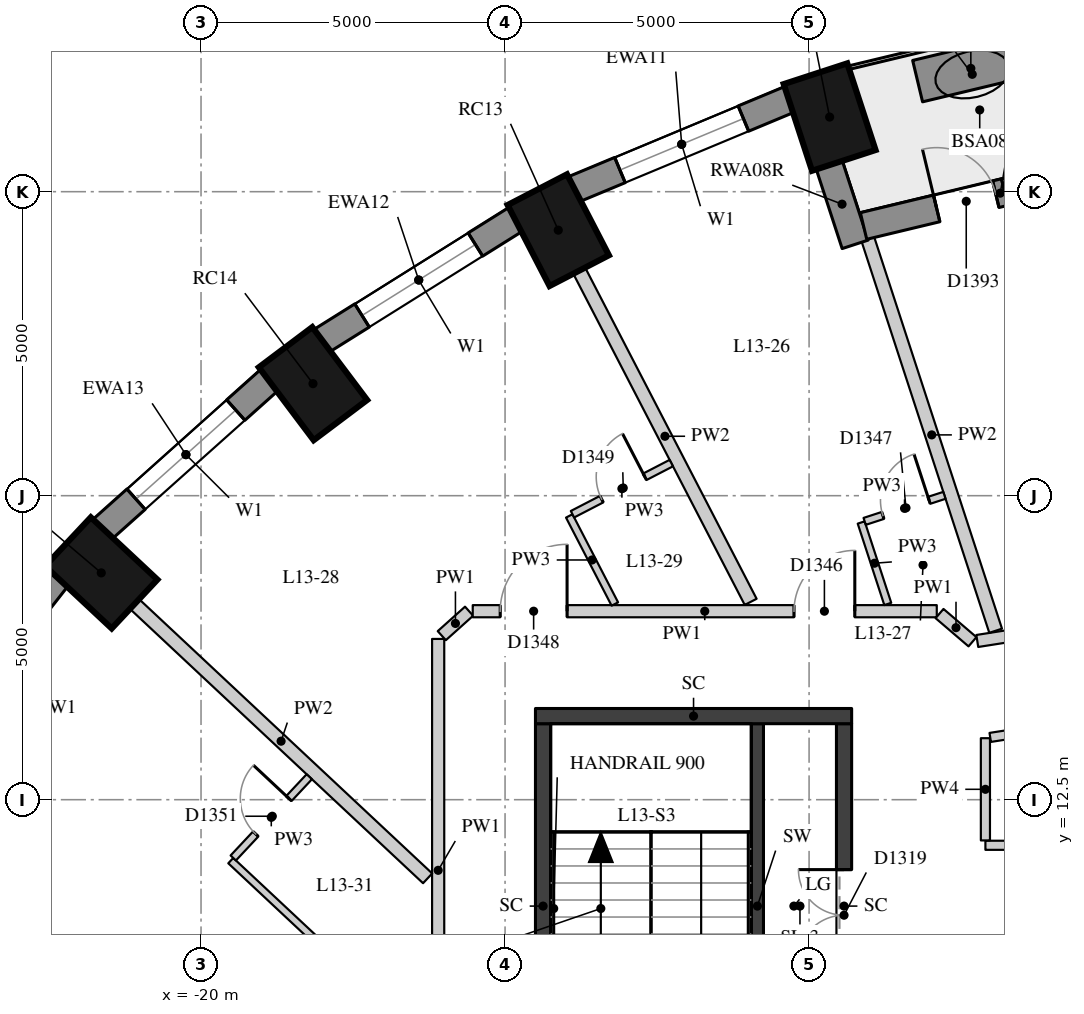
"""IFC4 building model, lengths in metres.
Left out: names, types, materials, properties, quantities, classifications, styles, units other than length and angle.
Written with IfcOpenShell. Run it as: python <this file> out.ifc"""

import sys

from ifc_helpers import new_model, si_unit, direction, frame, frame_2d, origin, origin_2d, place, context, subcontext, project, spatial, rectangle, extrude, element, fill, save


model = new_model("IFC4")
c1 = context("Model", 3, precision=1e-05, world=origin(), true_north=direction((0.0, 1.0)))
c2 = subcontext(c1, "Body", "Model", "MODEL_VIEW")
j1 = project(units=[si_unit("LENGTHUNIT", "METRE"), si_unit("PLANEANGLEUNIT", "RADIAN")], contexts=[c1])
p1 = place(None, origin())
s1 = spatial("IfcSite", under=j1, at=p1, CompositionType="ELEMENT")
p2 = place(p1, origin())
s2 = spatial("IfcBuilding", under=s1, at=p2, CompositionType="ELEMENT")
p3 = place(p2, frame((0.0, 0.0, 51.4)))
s3 = spatial("IfcBuildingStorey", under=s2, at=p3, CompositionType="ELEMENT", Elevation=51.4)
for number, where, z_axis, x_axis in (
    (1, (-9.662, 23.727, 0.0), (0.0, 0.0, 1.0), (-0.31, 0.951, 0.0)),
    (2, (-14.125, 21.867, 0.0), (0.0, 0.0, 1.0), (-0.46, 0.888, 0.0)),
    (3, (-18.159, 19.343, 0.0), (0.0, 0.0, 1.0), (-0.601, 0.799, 0.0)),
    (4, (-21.641, 16.23, 0.0), (0.0, 0.0, 1.0), (-0.73, 0.683, 0.0)),
):
    element("IfcColumn", number, at=place(p3, frame(where, z_axis=z_axis, x_axis=x_axis)), inside=s3, PredefinedType="COLUMN", context=c2, shape_type="SweptSolid", body=[
        extrude(rectangle(XDim=1.5, YDim=1.1, at=origin_2d()), origin(), (0.0, 0.0, 1.0), 3.3),
    ])
p4 = place(p3, frame((-10.315, 24.021, 0.0), z_axis=(0.0, 0.0, 1.0), x_axis=(-0.923031964282, -0.384723267966, 0.0)))
e5 = element("IfcWall", 5, at=p4, inside=s3, PredefinedType="SOLIDWALL", context=c2, shape_type="SweptSolid", body=[
    extrude(rectangle(XDim=3.856, YDim=0.45, at=frame_2d((1.928, 0.0))), origin(), (0.0, 0.0, 1.0), 3.02),
])
p5 = place(p4, frame((0.828, 0.0, 0.4)))
e6 = element("IfcOpeningElement", 6, at=p5, cuts=e5, PredefinedType="OPENING", context=c2, shape_type="SweptSolid", body=[
    extrude(rectangle(XDim=2.2, YDim=1.75, at=frame_2d((1.1, 0.875))), frame((0.0, 0.235, 0.0), z_axis=(0.0, -1.0, 0.0), x_axis=(1.0, 0.0, 0.0)), (0.0, 0.0, 1.0), 0.47),
])
p6 = place(p3, frame((-14.817, 22.051, 0.0), z_axis=(0.0, 0.0, 1.0), x_axis=(-0.847635480093, -0.530579016629, 0.0)))
e7 = element("IfcWall", 7, at=p6, inside=s3, PredefinedType="SOLIDWALL", context=c2, shape_type="SweptSolid", body=[
    extrude(rectangle(XDim=3.782, YDim=0.45, at=frame_2d((1.891, 0.0))), origin(), (0.0, 0.0, 1.0), 3.02),
])
p7 = place(p6, frame((0.791, 0.0, 0.4)))
e8 = element("IfcOpeningElement", 8, at=p7, cuts=e7, PredefinedType="OPENING", context=c2, shape_type="SweptSolid", body=[
    extrude(rectangle(XDim=2.2, YDim=1.75, at=frame_2d((1.1, 0.875))), frame((0.0, 0.235, 0.0), z_axis=(0.0, -1.0, 0.0), x_axis=(1.0, 0.0, 0.0)), (0.0, 0.0, 1.0), 0.47),
])
p8 = place(p3, frame((-18.871, 19.407, 0.0), z_axis=(0.0, 0.0, 1.0), x_axis=(-0.745526233716, -0.66647628228, 0.0)))
e9 = element("IfcWall", 9, at=p8, inside=s3, PredefinedType="SOLIDWALL", context=c2, shape_type="SweptSolid", body=[
    extrude(rectangle(XDim=3.697, YDim=0.45, at=frame_2d((1.848, 0.0))), origin(), (0.0, 0.0, 1.0), 3.02),
])
p9 = place(p8, frame((0.749, 0.0, 0.4)))
e10 = element("IfcOpeningElement", 10, at=p9, cuts=e9, PredefinedType="OPENING", context=c2, shape_type="SweptSolid", body=[
    extrude(rectangle(XDim=2.2, YDim=1.75, at=frame_2d((1.1, 0.875))), frame((0.0, 0.235, 0.0), z_axis=(0.0, -1.0, 0.0), x_axis=(1.0, 0.0, 0.0)), (0.0, 0.0, 1.0), 0.47),
])
p10 = place(p3, frame((-22.352, 16.17, 0.0), z_axis=(0.0, 0.0, 1.0), x_axis=(-0.616661975264, -0.787228053529, 0.0)))
e11 = element("IfcWall", 11, at=p10, inside=s3, PredefinedType="SOLIDWALL", context=c2, shape_type="SweptSolid", body=[
    extrude(rectangle(XDim=3.61, YDim=0.45, at=frame_2d((1.805, 0.0))), origin(), (0.0, 0.0, 1.0), 3.02),
])
p11 = place(p10, frame((0.705, 0.0, 0.4)))
e12 = element("IfcOpeningElement", 12, at=p11, cuts=e11, PredefinedType="OPENING", context=c2, shape_type="SweptSolid", body=[
    extrude(rectangle(XDim=2.2, YDim=1.75, at=frame_2d((1.1, 0.875))), frame((0.0, 0.235, 0.0), z_axis=(0.0, -1.0, 0.0), x_axis=(1.0, 0.0, 0.0)), (0.0, 0.0, 1.0), 0.47),
])
p12 = place(p3, frame((-9.674, 22.956, 0.0), z_axis=(0.0, 0.0, 1.0), x_axis=(0.310269011655, -0.950648799719, 0.0)))
e13 = element("IfcWall", 13, at=p12, inside=s3, PredefinedType="SOLIDWALL", context=c2, shape_type="SweptSolid", body=[
    extrude(rectangle(XDim=1.39, YDim=0.45, at=frame_2d((0.695, 0.0))), origin(), (0.0, 0.0, 1.0), 3.02),
])
p13 = place(p3, frame((-4.608, 23.016, 0.0), z_axis=(0.0, 0.0, 1.0), x_axis=(-0.972343667289, -0.233554688847, 0.0)))
e14 = element("IfcWall", 14, at=p13, inside=s3, PredefinedType="SOLIDWALL", context=c2, shape_type="SweptSolid", body=[
    extrude(rectangle(XDim=4.624, YDim=0.45, at=frame_2d((2.312, 0.0))), origin(), (0.0, 0.0, 1.0), 3.02),
])
p14 = place(p13, frame((1.237, 0.0, 0.4)))
e15 = element("IfcOpeningElement", 15, at=p14, cuts=e14, PredefinedType="OPENING", context=c2, shape_type="SweptSolid", body=[
    extrude(rectangle(XDim=1.0, YDim=1.75, at=frame_2d((0.5, 0.875))), frame((0.0, 0.235, 0.0), z_axis=(0.0, -1.0, 0.0), x_axis=(1.0, 0.0, 0.0)), (0.0, 0.0, 1.0), 0.47),
])
p15 = place(p13, frame((2.387, 0.0, 0.0)))
e16 = element("IfcOpeningElement", 16, at=p15, cuts=e14, PredefinedType="OPENING", context=c2, shape_type="SweptSolid", body=[
    extrude(rectangle(XDim=1.0, YDim=2.15, at=frame_2d((0.5, 1.075))), frame((0.0, 0.235, 0.0), z_axis=(0.0, -1.0, 0.0), x_axis=(1.0, 0.0, 0.0)), (0.0, 0.0, 1.0), 0.47),
])
p16 = place(p3, frame((-6.465, 24.737, 0.0), z_axis=(0.0, 0.0, 1.0), x_axis=(-0.972504142103, -0.232885580473, 0.0)))
e17 = element("IfcWall", 17, at=p16, inside=s3, PredefinedType="USERDEFINED", context=c2, shape_type="SweptSolid", body=[
    extrude(rectangle(XDim=1.8, YDim=0.7, at=frame_2d((0.9, 0.0))), origin(), (0.0, 0.0, 1.0), 0.75),
])
p17 = place(p3, frame((-10.85, 7.75, 0.0), z_axis=(0.0, 0.0, 1.0), x_axis=(0.0, 1.0, 0.0)))
e18 = element("IfcWall", 18, at=p17, inside=s3, PredefinedType="SHEAR", context=c2, shape_type="SweptSolid", body=[
    extrude(rectangle(XDim=6.0, YDim=0.2, at=frame_2d((3.0, 0.0))), origin(), (0.0, 0.0, 1.0), 3.02),
])
p18 = place(p17, frame((0.1, 0.0, 0.0)))
e19 = element("IfcOpeningElement", 19, at=p18, cuts=e18, PredefinedType="OPENING", context=c2, shape_type="SweptSolid", body=[
    extrude(rectangle(XDim=1.5, YDim=2.1, at=frame_2d((0.75, 1.05))), frame((0.0, 0.11, 0.0), z_axis=(0.0, -1.0, 0.0), x_axis=(1.0, 0.0, 0.0)), (0.0, 0.0, 1.0), 0.22),
])
p19 = place(p3, frame((-14.375, 7.75, -0.28), z_axis=(0.0, 0.0, 1.0), x_axis=(0.0, 1.0, 0.0)))
e20 = element("IfcWall", 20, at=p19, inside=s3, PredefinedType="SHEAR", context=c2, shape_type="SweptSolid", body=[
    extrude(rectangle(XDim=6.0, YDim=0.25, at=frame_2d((3.0, 0.0))), origin(), (0.0, 0.0, 1.0), 3.3),
])
p20 = place(p3, frame((-9.425, 7.75, -0.28), z_axis=(0.0, 0.0, 1.0), x_axis=(0.0, 1.0, 0.0)))
e21 = element("IfcWall", 21, at=p20, inside=s3, PredefinedType="SHEAR", context=c2, shape_type="SweptSolid", body=[
    extrude(rectangle(XDim=6.0, YDim=0.25, at=frame_2d((3.0, 0.0))), origin(), (0.0, 0.0, 1.0), 3.3),
])
p21 = place(p20, frame((2.1, 0.0, 0.28)))
e22 = element("IfcOpeningElement", 22, at=p21, cuts=e21, PredefinedType="OPENING", context=c2, shape_type="SweptSolid", body=[
    extrude(rectangle(XDim=1.5, YDim=2.1, at=frame_2d((0.75, 1.05))), frame((0.0, 0.135, 0.0), z_axis=(0.0, -1.0, 0.0), x_axis=(1.0, 0.0, 0.0)), (0.0, 0.0, 1.0), 0.27),
])
p22 = place(p3, frame((-14.5, 13.875, -0.28), z_axis=(0.0, 0.0, 1.0), x_axis=(1.0, 0.0, 0.0)))
e23 = element("IfcWall", 23, at=p22, inside=s3, PredefinedType="SHEAR", context=c2, shape_type="SweptSolid", body=[
    extrude(rectangle(XDim=5.2, YDim=0.25, at=frame_2d((2.6, 0.0))), origin(), (0.0, 0.0, 1.0), 3.3),
])
p23 = place(p3, frame((-16.1, 7.533, 0.0), z_axis=(0.0, 0.0, 1.0), x_axis=(0.0, 1.0, 0.0)))
e24 = element("IfcWall", 24, at=p23, inside=s3, PredefinedType="PARTITIONING", context=c2, shape_type="SweptSolid", body=[
    extrude(rectangle(XDim=7.611, YDim=0.2, at=frame_2d((3.806, 0.0))), origin(), (0.0, 0.0, 1.0), 3.02),
])
p24 = place(p3, frame((-16.041, 15.198, 0.0), z_axis=(0.0, 0.0, 1.0), x_axis=(0.744722115519, 0.667374685359, 0.0)))
e25 = element("IfcWall", 25, at=p24, inside=s3, PredefinedType="PARTITIONING", context=c2, shape_type="SweptSolid", body=[
    extrude(rectangle(XDim=0.603, YDim=0.2, at=frame_2d((0.301, 0.0))), origin(), (0.0, 0.0, 1.0), 3.02),
])
p25 = place(p3, frame((-15.531, 15.6, 0.0), z_axis=(0.0, 0.0, 1.0), x_axis=(1.0, 0.0, 0.0)))
e26 = element("IfcWall", 26, at=p25, inside=s3, PredefinedType="PARTITIONING", context=c2, shape_type="SweptSolid", body=[
    extrude(rectangle(XDim=7.632, YDim=0.2, at=frame_2d((3.816, 0.0))), origin(), (0.0, 0.0, 1.0), 3.02),
])
p26 = place(p25, frame((5.283, 0.0, 0.0)))
e27 = element("IfcOpeningElement", 27, at=p26, cuts=e26, PredefinedType="OPENING", context=c2, shape_type="SweptSolid", body=[
    extrude(rectangle(XDim=1.0, YDim=2.1, at=frame_2d((0.5, 1.05))), frame((0.0, 0.11, 0.0), z_axis=(0.0, -1.0, 0.0), x_axis=(1.0, 0.0, 0.0)), (0.0, 0.0, 1.0), 0.22),
])
p27 = place(p25, frame((0.451, 0.0, 0.0)))
e28 = element("IfcOpeningElement", 28, at=p27, cuts=e26, PredefinedType="OPENING", context=c2, shape_type="SweptSolid", body=[
    extrude(rectangle(XDim=1.1, YDim=2.1, at=frame_2d((0.55, 1.05))), frame((0.0, 0.11, 0.0), z_axis=(0.0, -1.0, 0.0), x_axis=(1.0, 0.0, 0.0)), (0.0, 0.0, 1.0), 0.22),
])
p28 = place(p3, frame((-7.854, 15.561, 0.0), z_axis=(0.0, 0.0, 1.0), x_axis=(0.759763914627, -0.650199041856, 0.0)))
e29 = element("IfcWall", 29, at=p28, inside=s3, PredefinedType="PARTITIONING", context=c2, shape_type="SweptSolid", body=[
    extrude(rectangle(XDim=0.713, YDim=0.2, at=frame_2d((0.356, 0.0))), origin(), (0.0, 0.0, 1.0), 3.02),
])
p29 = place(p3, frame((-7.234, 15.11, 0.0), z_axis=(0.0, 0.0, 1.0), x_axis=(0.987957763282, 0.154723811906, 0.0)))
e30 = element("IfcWall", 30, at=p29, inside=s3, PredefinedType="PARTITIONING", context=c2, shape_type="SweptSolid", body=[
    extrude(rectangle(XDim=11.012, YDim=0.2, at=frame_2d((5.506, 0.0))), origin(), (0.0, 0.0, 1.0), 3.02),
])
p30 = place(p29, frame((8.605, 0.0, 0.0)))
e31 = element("IfcOpeningElement", 31, at=p30, cuts=e30, PredefinedType="OPENING", context=c2, shape_type="SweptSolid", body=[
    extrude(rectangle(XDim=0.9, YDim=2.1, at=frame_2d((0.45, 1.05))), frame((0.0, 0.11, 0.0), z_axis=(0.0, -1.0, 0.0), x_axis=(1.0, 0.0, 0.0)), (0.0, 0.0, 1.0), 0.22),
])
p31 = place(p29, frame((5.116, 0.0, 0.0)))
e32 = element("IfcOpeningElement", 32, at=p31, cuts=e30, PredefinedType="OPENING", context=c2, shape_type="SweptSolid", body=[
    extrude(rectangle(XDim=0.9, YDim=2.1, at=frame_2d((0.45, 1.05))), frame((0.0, 0.11, 0.0), z_axis=(0.0, -1.0, 0.0), x_axis=(1.0, 0.0, 0.0)), (0.0, 0.0, 1.0), 0.22),
])
p32 = place(p29, frame((1.626, 0.0, 0.0)))
e33 = element("IfcOpeningElement", 33, at=p32, cuts=e30, PredefinedType="OPENING", context=c2, shape_type="SweptSolid", body=[
    extrude(rectangle(XDim=0.9, YDim=2.1, at=frame_2d((0.45, 1.05))), frame((0.0, 0.11, 0.0), z_axis=(0.0, -1.0, 0.0), x_axis=(1.0, 0.0, 0.0)), (0.0, 0.0, 1.0), 0.22),
])
p33 = place(p3, frame((-4.58, 11.75, 0.0), z_axis=(0.0, 0.0, 1.0), x_axis=(-1.0, 0.0, 0.0)))
e34 = element("IfcWall", 34, at=p33, inside=s3, PredefinedType="PARTITIONING", context=c2, shape_type="SweptSolid", body=[
    extrude(rectangle(XDim=2.52, YDim=0.15, at=frame_2d((1.26, 0.0))), origin(), (0.0, 0.0, 1.0), 3.02),
])
p34 = place(p3, frame((-7.1, 11.83, 0.0), z_axis=(0.0, 0.0, 1.0), x_axis=(0.0, 1.0, 0.0)))
e35 = element("IfcWall", 35, at=p34, inside=s3, PredefinedType="PARTITIONING", context=c2, shape_type="SweptSolid", body=[
    extrude(rectangle(XDim=1.681, YDim=0.15, at=frame_2d((0.841, 0.0))), origin(), (0.0, 0.0, 1.0), 3.02),
])
p35 = place(p3, frame((-7.021, 13.524, 0.0), z_axis=(0.0, 0.0, 1.0), x_axis=(0.987976394461, 0.154604799366, 0.0)))
e36 = element("IfcWall", 36, at=p35, inside=s3, PredefinedType="PARTITIONING", context=c2, shape_type="SweptSolid", body=[
    extrude(rectangle(XDim=2.124, YDim=0.15, at=frame_2d((1.062, 0.0))), origin(), (0.0, 0.0, 1.0), 2.57),
])
p36 = place(p3, frame((-9.034, 21.721, 0.0), z_axis=(0.0, 0.0, 1.0), x_axis=(0.310212430052, -0.950667264736, 0.0)))
e37 = element("IfcWall", 37, at=p36, inside=s3, PredefinedType="PARTITIONING", context=c2, shape_type="SweptSolid", body=[
    extrude(rectangle(XDim=6.777, YDim=0.22, at=frame_2d((3.388, 0.0))), origin(), (0.0, 0.0, 1.0), 3.02),
])
p37 = place(p3, frame((-13.78, 21.201, 0.0), z_axis=(0.0, 0.0, 1.0), x_axis=(0.459699000582, -0.888074787878, 0.0)))
e38 = element("IfcWall", 38, at=p37, inside=s3, PredefinedType="PARTITIONING", context=c2, shape_type="SweptSolid", body=[
    extrude(rectangle(XDim=6.134, YDim=0.22, at=frame_2d((3.067, 0.0))), origin(), (0.0, 0.0, 1.0), 3.02),
])
p38 = place(p3, frame((-21.093, 15.718, 0.0), z_axis=(0.0, 0.0, 1.0), x_axis=(0.73009284205, -0.683347965525, 0.0)))
e39 = element("IfcWall", 39, at=p38, inside=s3, PredefinedType="PARTITIONING", context=c2, shape_type="SweptSolid", body=[
    extrude(rectangle(XDim=6.602, YDim=0.22, at=frame_2d((3.301, 0.0))), origin(), (0.0, 0.0, 1.0), 3.02),
])
p39 = place(p3, frame((-8.706, 15.719, 0.0), z_axis=(0.0, 0.0, 1.0), x_axis=(-0.310245242974, 0.950656556918, 0.0)))
e40 = element("IfcWall", 40, at=p39, inside=s3, PredefinedType="PARTITIONING", context=c2, shape_type="SweptSolid", body=[
    extrude(rectangle(XDim=1.409, YDim=0.12, at=frame_2d((0.705, 0.0))), origin(), (0.0, 0.0, 1.0), 3.02),
])
p40 = place(p3, frame((-13.194, 15.718, 0.0), z_axis=(0.0, 0.0, 1.0), x_axis=(-0.459736274936, 0.888055492359, 0.0)))
e41 = element("IfcWall", 41, at=p40, inside=s3, PredefinedType="PARTITIONING", context=c2, shape_type="SweptSolid", body=[
    extrude(rectangle(XDim=1.632, YDim=0.12, at=frame_2d((0.816, 0.0))), origin(), (0.0, 0.0, 1.0), 3.02),
])
p41 = place(p3, frame((-16.229, 8.426, 0.0), z_axis=(0.0, 0.0, 1.0), x_axis=(-0.730077325201, 0.683364543438, 0.0)))
e42 = element("IfcWall", 42, at=p41, inside=s3, PredefinedType="PARTITIONING", context=c2, shape_type="SweptSolid", body=[
    extrude(rectangle(XDim=4.495, YDim=0.12, at=frame_2d((2.247, 0.0))), origin(), (0.0, 0.0, 1.0), 3.02),
])
p42 = place(p3, frame((-9.086, 17.077, 0.0), z_axis=(0.0, 0.0, 1.0), x_axis=(0.950576687533, 0.310489872812, 0.0)))
e43 = element("IfcWall", 43, at=p42, inside=s3, PredefinedType="PARTITIONING", context=c2, shape_type="SweptSolid", body=[
    extrude(rectangle(XDim=1.38, YDim=0.12, at=frame_2d((0.69, 0.0))), origin(), (0.0, 0.0, 1.0), 3.02),
])
p43 = place(p42, frame((0.315, 0.0, 0.0)))
e44 = element("IfcOpeningElement", 44, at=p43, cuts=e43, PredefinedType="OPENING", context=c2, shape_type="SweptSolid", body=[
    extrude(rectangle(XDim=0.8, YDim=2.1, at=frame_2d((0.4, 1.05))), frame((0.0, 0.07, 0.0), z_axis=(0.0, -1.0, 0.0), x_axis=(1.0, 0.0, 0.0)), (0.0, 0.0, 1.0), 0.14),
])
p44 = place(p3, frame((-13.891, 17.195, 0.0), z_axis=(0.0, 0.0, 1.0), x_axis=(0.88806930088, 0.459709600546, 0.0)))
e45 = element("IfcWall", 45, at=p44, inside=s3, PredefinedType="PARTITIONING", context=c2, shape_type="SweptSolid", body=[
    extrude(rectangle(XDim=1.83, YDim=0.12, at=frame_2d((0.915, 0.0))), origin(), (0.0, 0.0, 1.0), 3.02),
])
p45 = place(p44, frame((0.54, 0.0, 0.0)))
e46 = element("IfcOpeningElement", 46, at=p45, cuts=e45, PredefinedType="OPENING", context=c2, shape_type="SweptSolid", body=[
    extrude(rectangle(XDim=0.8, YDim=2.1, at=frame_2d((0.4, 1.05))), frame((0.0, 0.07, 0.0), z_axis=(0.0, -1.0, 0.0), x_axis=(1.0, 0.0, 0.0)), (0.0, 0.0, 1.0), 0.14),
])
p46 = place(p3, frame((-19.47, 11.542, 0.0), z_axis=(0.0, 0.0, 1.0), x_axis=(0.683306289544, 0.730131847456, 0.0)))
e47 = element("IfcWall", 47, at=p46, inside=s3, PredefinedType="PARTITIONING", context=c2, shape_type="SweptSolid", body=[
    extrude(rectangle(XDim=1.83, YDim=0.12, at=frame_2d((0.915, 0.0))), origin(), (0.0, 0.0, 1.0), 3.02),
])
p47 = place(p46, frame((0.54, 0.0, 0.0)))
e48 = element("IfcOpeningElement", 48, at=p47, cuts=e47, PredefinedType="OPENING", context=c2, shape_type="SweptSolid", body=[
    extrude(rectangle(XDim=0.8, YDim=2.1, at=frame_2d((0.4, 1.05))), frame((0.0, 0.07, 0.0), z_axis=(0.0, -1.0, 0.0), x_axis=(1.0, 0.0, 0.0)), (0.0, 0.0, 1.0), 0.14),
])
p48 = place(p5, origin())
e49 = element("IfcWindow", 49, at=p48, inside=s3, PartitioningType="SINGLE_PANEL", PredefinedType="WINDOW", context=c2, shape_type="SweptSolid", body=[
    extrude(rectangle(XDim=2.2, YDim=1.75, at=frame_2d((1.1, 0.875))), frame((0.0, 0.035, 0.0), z_axis=(0.0, -1.0, 0.0), x_axis=(1.0, 0.0, 0.0)), (0.0, 0.0, 1.0), 0.06),
])
fill(e6, e49)
p49 = place(p7, origin())
e50 = element("IfcWindow", 50, at=p49, inside=s3, PartitioningType="SINGLE_PANEL", PredefinedType="WINDOW", context=c2, shape_type="SweptSolid", body=[
    extrude(rectangle(XDim=2.2, YDim=1.75, at=frame_2d((1.1, 0.875))), frame((0.0, 0.035, 0.0), z_axis=(0.0, -1.0, 0.0), x_axis=(1.0, 0.0, 0.0)), (0.0, 0.0, 1.0), 0.06),
])
fill(e8, e50)
p50 = place(p9, origin())
e51 = element("IfcWindow", 51, at=p50, inside=s3, PartitioningType="SINGLE_PANEL", PredefinedType="WINDOW", context=c2, shape_type="SweptSolid", body=[
    extrude(rectangle(XDim=2.2, YDim=1.75, at=frame_2d((1.1, 0.875))), frame((0.0, 0.035, 0.0), z_axis=(0.0, -1.0, 0.0), x_axis=(1.0, 0.0, 0.0)), (0.0, 0.0, 1.0), 0.06),
])
fill(e10, e51)
p51 = place(p15, frame((1.0, 0.0, 0.0), z_axis=(0.0, 0.0, 1.0), x_axis=(-1.0, 0.0, 0.0)))
e52 = element("IfcDoor", 52, at=p51, inside=s3, OperationType="SINGLE_SWING_LEFT", PredefinedType="DOOR", context=c2, shape_type="SweptSolid", body=[
    extrude(rectangle(XDim=1.0, YDim=2.15, at=frame_2d((0.5, 1.075))), frame((0.0, 0.075, 0.0), z_axis=(0.0, -1.0, 0.0), x_axis=(1.0, 0.0, 0.0)), (0.0, 0.0, 1.0), 0.05),
])
fill(e16, e52)
p52 = place(p21, origin())
e53 = element("IfcDoor", 53, at=p52, inside=s3, OperationType="DOUBLE_DOOR_SINGLE_SWING", PredefinedType="DOOR", context=c2, shape_type="SweptSolid", body=[
    extrude(rectangle(XDim=1.5, YDim=2.1, at=frame_2d((0.75, 1.05))), frame((0.0, 0.025, 0.0), z_axis=(0.0, -1.0, 0.0), x_axis=(1.0, 0.0, 0.0)), (0.0, 0.0, 1.0), 0.05),
])
fill(e22, e53)
p53 = place(p26, origin())
e54 = element("IfcDoor", 54, at=p53, inside=s3, OperationType="SINGLE_SWING_RIGHT", PredefinedType="DOOR", context=c2, shape_type="SweptSolid", body=[
    extrude(rectangle(XDim=1.0, YDim=2.1, at=frame_2d((0.5, 1.05))), frame((0.0, 0.025, 0.0), z_axis=(0.0, -1.0, 0.0), x_axis=(1.0, 0.0, 0.0)), (0.0, 0.0, 1.0), 0.05),
])
fill(e27, e54)
p54 = place(p43, origin())
e55 = element("IfcDoor", 55, at=p54, inside=s3, OperationType="SINGLE_SWING_RIGHT", PredefinedType="DOOR", context=c2, shape_type="SweptSolid", body=[
    extrude(rectangle(XDim=0.8, YDim=2.1, at=frame_2d((0.4, 1.05))), frame((0.0, 0.025, 0.0), z_axis=(0.0, -1.0, 0.0), x_axis=(1.0, 0.0, 0.0)), (0.0, 0.0, 1.0), 0.05),
])
fill(e44, e55)
p55 = place(p27, origin())
e56 = element("IfcDoor", 56, at=p55, inside=s3, OperationType="SINGLE_SWING_RIGHT", PredefinedType="DOOR", context=c2, shape_type="SweptSolid", body=[
    extrude(rectangle(XDim=1.1, YDim=2.1, at=frame_2d((0.55, 1.05))), frame((0.0, 0.025, 0.0), z_axis=(0.0, -1.0, 0.0), x_axis=(1.0, 0.0, 0.0)), (0.0, 0.0, 1.0), 0.05),
])
fill(e28, e56)
p56 = place(p45, origin())
e57 = element("IfcDoor", 57, at=p56, inside=s3, OperationType="SINGLE_SWING_RIGHT", PredefinedType="DOOR", context=c2, shape_type="SweptSolid", body=[
    extrude(rectangle(XDim=0.8, YDim=2.1, at=frame_2d((0.4, 1.05))), frame((0.0, 0.025, 0.0), z_axis=(0.0, -1.0, 0.0), x_axis=(1.0, 0.0, 0.0)), (0.0, 0.0, 1.0), 0.05),
])
fill(e46, e57)
p57 = place(p47, origin())
e58 = element("IfcDoor", 58, at=p57, inside=s3, OperationType="SINGLE_SWING_RIGHT", PredefinedType="DOOR", context=c2, shape_type="SweptSolid", body=[
    extrude(rectangle(XDim=0.8, YDim=2.1, at=frame_2d((0.4, 1.05))), frame((0.0, 0.025, 0.0), z_axis=(0.0, -1.0, 0.0), x_axis=(1.0, 0.0, 0.0)), (0.0, 0.0, 1.0), 0.05),
])
fill(e48, e58)
save(model, sys.argv[1])
